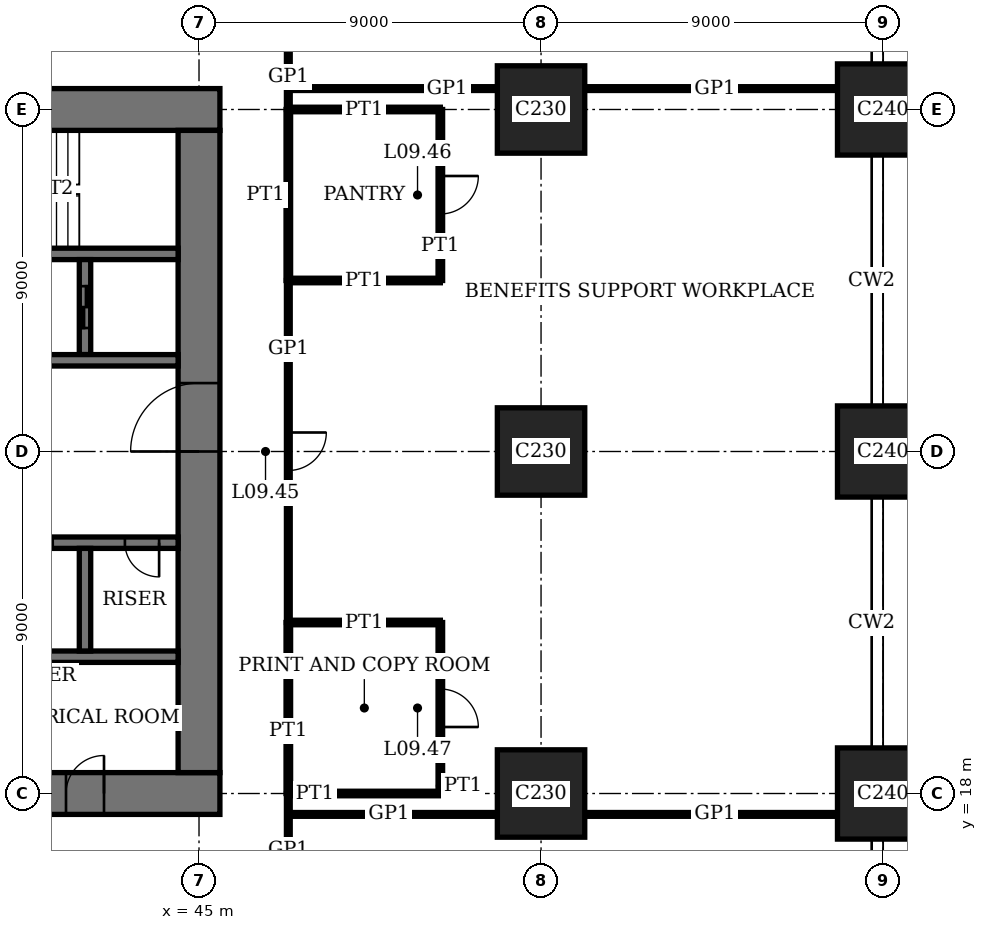
"""IFC4 building model, lengths in metres.
Left out: names, types, materials, properties, quantities, classifications, styles, units other than length and angle.
Written with IfcOpenShell. Run it as: python <this file> out.ifc"""

import sys

from ifc_helpers import new_model, si_unit, direction, frame, frame_2d, origin, origin_2d, place, context, subcontext, project, spatial, rectangle, extrude, element, fill, save


model = new_model("IFC4")
c1 = context("Model", 3, precision=1e-05, world=origin(), true_north=direction((0.0, 1.0)))
c2 = subcontext(c1, "Body", "Model", "MODEL_VIEW")
j1 = project(units=[si_unit("LENGTHUNIT", "METRE"), si_unit("PLANEANGLEUNIT", "RADIAN")], contexts=[c1])
p1 = place(None, origin())
s1 = spatial("IfcSite", under=j1, at=p1, CompositionType="ELEMENT")
p2 = place(p1, origin())
s2 = spatial("IfcBuilding", under=s1, at=p2, CompositionType="ELEMENT")
p3 = place(p2, frame((0.0, 0.0, 39.8)))
s3 = spatial("IfcBuildingStorey", under=s2, at=p3, CompositionType="ELEMENT", Elevation=39.8)
for number, where, z_axis, x_axis in (
    (1, (54.0, 18.0, 0.0), (0.0, 0.0, 1.0), (1.0, 0.0, 0.0)),
    (2, (54.0, 27.0, 0.0), (0.0, 0.0, 1.0), (1.0, 0.0, 0.0)),
    (3, (54.0, 36.0, 0.0), (0.0, 0.0, 1.0), (1.0, 0.0, 0.0)),
):
    element("IfcColumn", number, at=place(p3, frame(where, z_axis=z_axis, x_axis=x_axis)), inside=s3, PredefinedType="COLUMN", context=c2, shape_type="SweptSolid", body=[
        extrude(rectangle(XDim=2.3, YDim=2.3, at=origin_2d()), origin(), (0.0, 0.0, 1.0), 4.0),
    ])
for number, where, z_axis, x_axis in (
    (4, (63.0, 18.0, 0.0), (0.0, 0.0, 1.0), (1.0, 0.0, 0.0)),
    (5, (63.0, 27.0, 0.0), (0.0, 0.0, 1.0), (1.0, 0.0, 0.0)),
    (6, (63.0, 36.0, 0.0), (0.0, 0.0, 1.0), (1.0, 0.0, 0.0)),
):
    element("IfcColumn", number, at=place(p3, frame(where, z_axis=z_axis, x_axis=x_axis)), inside=s3, PredefinedType="COLUMN", context=c2, shape_type="SweptSolid", body=[
        extrude(rectangle(XDim=2.4, YDim=2.4, at=origin_2d()), origin(), (0.0, 0.0, 1.0), 4.0),
    ])
p4 = place(p3, frame((17.45, 18.0, 0.0), z_axis=(0.0, 0.0, 1.0), x_axis=(1.0, 0.0, 0.0)))
e7 = element("IfcWall", 7, at=p4, inside=s3, PredefinedType="SHEAR", context=c2, shape_type="SweptSolid", body=[
    extrude(rectangle(XDim=28.1, YDim=1.1, at=frame_2d((14.05, 0.0))), origin(), (0.0, 0.0, 1.0), 4.0),
])
p5 = place(p4, frame((11.55, 0.0, 0.0)))
e8 = element("IfcOpeningElement", 8, at=p5, cuts=e7, PredefinedType="OPENING", context=c2, shape_type="SweptSolid", body=[
    extrude(rectangle(XDim=1.0, YDim=2.4, at=frame_2d((0.5, 1.2))), frame((0.0, 0.56, 0.0), z_axis=(0.0, -1.0, 0.0), x_axis=(1.0, 0.0, 0.0)), (0.0, 0.0, 1.0), 1.12),
])
p6 = place(p4, frame((16.55, 0.0, 0.0)))
e9 = element("IfcOpeningElement", 9, at=p6, cuts=e7, PredefinedType="OPENING", context=c2, shape_type="SweptSolid", body=[
    extrude(rectangle(XDim=1.0, YDim=2.4, at=frame_2d((0.5, 1.2))), frame((0.0, 0.56, 0.0), z_axis=(0.0, -1.0, 0.0), x_axis=(1.0, 0.0, 0.0)), (0.0, 0.0, 1.0), 1.12),
])
p7 = place(p4, frame((20.0, 0.0, 0.0)))
e10 = element("IfcOpeningElement", 10, at=p7, cuts=e7, PredefinedType="OPENING", context=c2, shape_type="SweptSolid", body=[
    extrude(rectangle(XDim=1.1, YDim=2.4, at=frame_2d((0.55, 1.2))), frame((0.0, 0.56, 0.0), z_axis=(0.0, -1.0, 0.0), x_axis=(1.0, 0.0, 0.0)), (0.0, 0.0, 1.0), 1.12),
])
p8 = place(p4, frame((24.05, 0.0, 0.0)))
e11 = element("IfcOpeningElement", 11, at=p8, cuts=e7, PredefinedType="OPENING", context=c2, shape_type="SweptSolid", body=[
    extrude(rectangle(XDim=1.0, YDim=2.4, at=frame_2d((0.5, 1.2))), frame((0.0, 0.56, 0.0), z_axis=(0.0, -1.0, 0.0), x_axis=(1.0, 0.0, 0.0)), (0.0, 0.0, 1.0), 1.12),
])
p9 = place(p3, frame((45.55, 36.0, 0.0), z_axis=(0.0, 0.0, 1.0), x_axis=(-1.0, 0.0, 0.0)))
e12 = element("IfcWall", 12, at=p9, inside=s3, PredefinedType="SHEAR", context=c2, shape_type="SweptSolid", body=[
    extrude(rectangle(XDim=28.1, YDim=1.1, at=frame_2d((14.05, 0.0))), origin(), (0.0, 0.0, 1.0), 4.0),
])
p10 = place(p9, frame((11.55, 0.0, 0.0)))
e13 = element("IfcOpeningElement", 13, at=p10, cuts=e12, PredefinedType="OPENING", context=c2, shape_type="SweptSolid", body=[
    extrude(rectangle(XDim=1.0, YDim=2.4, at=frame_2d((0.5, 1.2))), frame((0.0, 0.56, 0.0), z_axis=(0.0, -1.0, 0.0), x_axis=(1.0, 0.0, 0.0)), (0.0, 0.0, 1.0), 1.12),
])
p11 = place(p9, frame((16.55, 0.0, 0.0)))
e14 = element("IfcOpeningElement", 14, at=p11, cuts=e12, PredefinedType="OPENING", context=c2, shape_type="SweptSolid", body=[
    extrude(rectangle(XDim=1.0, YDim=2.4, at=frame_2d((0.5, 1.2))), frame((0.0, 0.56, 0.0), z_axis=(0.0, -1.0, 0.0), x_axis=(1.0, 0.0, 0.0)), (0.0, 0.0, 1.0), 1.12),
])
p12 = place(p9, frame((20.0, 0.0, 0.0)))
e15 = element("IfcOpeningElement", 15, at=p12, cuts=e12, PredefinedType="OPENING", context=c2, shape_type="SweptSolid", body=[
    extrude(rectangle(XDim=1.1, YDim=2.4, at=frame_2d((0.55, 1.2))), frame((0.0, 0.56, 0.0), z_axis=(0.0, -1.0, 0.0), x_axis=(1.0, 0.0, 0.0)), (0.0, 0.0, 1.0), 1.12),
])
p13 = place(p9, frame((24.05, 0.0, 0.0)))
e16 = element("IfcOpeningElement", 16, at=p13, cuts=e12, PredefinedType="OPENING", context=c2, shape_type="SweptSolid", body=[
    extrude(rectangle(XDim=1.0, YDim=2.4, at=frame_2d((0.5, 1.2))), frame((0.0, 0.56, 0.0), z_axis=(0.0, -1.0, 0.0), x_axis=(1.0, 0.0, 0.0)), (0.0, 0.0, 1.0), 1.12),
])
p14 = place(p3, frame((45.0, 18.55, 0.0), z_axis=(0.0, 0.0, 1.0), x_axis=(0.0, 1.0, 0.0)))
e17 = element("IfcWall", 17, at=p14, inside=s3, PredefinedType="SHEAR", context=c2, shape_type="SweptSolid", body=[
    extrude(rectangle(XDim=16.9, YDim=1.1, at=frame_2d((8.45, 0.0))), origin(), (0.0, 0.0, 1.0), 4.0),
])
p15 = place(p14, frame((8.45, 0.0, 0.0)))
e18 = element("IfcOpeningElement", 18, at=p15, cuts=e17, PredefinedType="OPENING", context=c2, shape_type="SweptSolid", body=[
    extrude(rectangle(XDim=1.8, YDim=2.4, at=frame_2d((0.9, 1.2))), frame((0.0, 0.56, 0.0), z_axis=(0.0, -1.0, 0.0), x_axis=(1.0, 0.0, 0.0)), (0.0, 0.0, 1.0), 1.12),
])
p16 = place(p3, frame((36.15, 32.2, 0.0), z_axis=(0.0, 0.0, 1.0), x_axis=(1.0, 0.0, 0.0)))
e19 = element("IfcWall", 19, at=p16, inside=s3, PredefinedType="SHEAR", context=c2, shape_type="SweptSolid", body=[
    extrude(rectangle(XDim=8.3, YDim=0.3, at=frame_2d((4.15, 0.0))), origin(), (0.0, 0.0, 1.0), 4.0),
])
p17 = place(p16, frame((0.45, 0.0, 0.0)))
e20 = element("IfcOpeningElement", 20, at=p17, cuts=e19, PredefinedType="OPENING", context=c2, shape_type="SweptSolid", body=[
    extrude(rectangle(XDim=1.0, YDim=2.4, at=frame_2d((0.5, 1.2))), frame((0.0, 0.16, 0.0), z_axis=(0.0, -1.0, 0.0), x_axis=(1.0, 0.0, 0.0)), (0.0, 0.0, 1.0), 0.32),
])
p18 = place(p3, frame((42.0, 29.55, 0.0), z_axis=(0.0, 0.0, 1.0), x_axis=(0.0, 1.0, 0.0)))
e21 = element("IfcWall", 21, at=p18, inside=s3, PredefinedType="SHEAR", context=c2, shape_type="SweptSolid", body=[
    extrude(rectangle(XDim=2.5, YDim=0.3, at=frame_2d((1.25, 0.0))), origin(), (0.0, 0.0, 1.0), 4.0),
])
p19 = place(p18, frame((0.7, 0.0, 0.0)))
e22 = element("IfcOpeningElement", 22, at=p19, cuts=e21, PredefinedType="OPENING", context=c2, shape_type="SweptSolid", body=[
    extrude(rectangle(XDim=1.1, YDim=2.4, at=frame_2d((0.55, 1.2))), frame((0.0, 0.16, 0.0), z_axis=(0.0, -1.0, 0.0), x_axis=(1.0, 0.0, 0.0)), (0.0, 0.0, 1.0), 0.32),
])
p20 = place(p3, frame((18.55, 24.6, 0.0), z_axis=(0.0, 0.0, 1.0), x_axis=(1.0, 0.0, 0.0)))
e23 = element("IfcWall", 23, at=p20, inside=s3, PredefinedType="SHEAR", context=c2, shape_type="SweptSolid", body=[
    extrude(rectangle(XDim=25.9, YDim=0.3, at=frame_2d((12.95, 0.0))), origin(), (0.0, 0.0, 1.0), 4.0),
])
p21 = place(p20, frame((4.95, 0.0, 0.0)))
e24 = element("IfcOpeningElement", 24, at=p21, cuts=e23, PredefinedType="OPENING", context=c2, shape_type="SweptSolid", body=[
    extrude(rectangle(XDim=1.0, YDim=2.4, at=frame_2d((0.5, 1.2))), frame((0.0, 0.16, 0.0), z_axis=(0.0, -1.0, 0.0), x_axis=(1.0, 0.0, 0.0)), (0.0, 0.0, 1.0), 0.32),
])
p22 = place(p20, frame((24.5, 0.0, 0.0)))
e25 = element("IfcOpeningElement", 25, at=p22, cuts=e23, PredefinedType="OPENING", context=c2, shape_type="SweptSolid", body=[
    extrude(rectangle(XDim=0.9, YDim=2.1, at=frame_2d((0.45, 1.05))), frame((0.0, 0.16, 0.0), z_axis=(0.0, -1.0, 0.0), x_axis=(1.0, 0.0, 0.0)), (0.0, 0.0, 1.0), 0.32),
])
p23 = place(p20, frame((9.4, 0.0, 0.0)))
e26 = element("IfcOpeningElement", 26, at=p23, cuts=e23, PredefinedType="OPENING", context=c2, shape_type="SweptSolid", body=[
    extrude(rectangle(XDim=1.1, YDim=2.4, at=frame_2d((0.55, 1.2))), frame((0.0, 0.16, 0.0), z_axis=(0.0, -1.0, 0.0), x_axis=(1.0, 0.0, 0.0)), (0.0, 0.0, 1.0), 0.32),
])
p24 = place(p20, frame((12.4, 0.0, 0.0)))
e27 = element("IfcOpeningElement", 27, at=p24, cuts=e23, PredefinedType="OPENING", context=c2, shape_type="SweptSolid", body=[
    extrude(rectangle(XDim=1.1, YDim=2.4, at=frame_2d((0.55, 1.2))), frame((0.0, 0.16, 0.0), z_axis=(0.0, -1.0, 0.0), x_axis=(1.0, 0.0, 0.0)), (0.0, 0.0, 1.0), 0.32),
])
p25 = place(p20, frame((15.4, 0.0, 0.0)))
e28 = element("IfcOpeningElement", 28, at=p25, cuts=e23, PredefinedType="OPENING", context=c2, shape_type="SweptSolid", body=[
    extrude(rectangle(XDim=1.1, YDim=2.4, at=frame_2d((0.55, 1.2))), frame((0.0, 0.16, 0.0), z_axis=(0.0, -1.0, 0.0), x_axis=(1.0, 0.0, 0.0)), (0.0, 0.0, 1.0), 0.32),
])
p26 = place(p20, frame((18.4, 0.0, 0.0)))
e29 = element("IfcOpeningElement", 29, at=p26, cuts=e23, PredefinedType="OPENING", context=c2, shape_type="SweptSolid", body=[
    extrude(rectangle(XDim=1.1, YDim=2.4, at=frame_2d((0.55, 1.2))), frame((0.0, 0.16, 0.0), z_axis=(0.0, -1.0, 0.0), x_axis=(1.0, 0.0, 0.0)), (0.0, 0.0, 1.0), 0.32),
])
p27 = place(p20, frame((21.3, 0.0, 0.0)))
e30 = element("IfcOpeningElement", 30, at=p27, cuts=e23, PredefinedType="OPENING", context=c2, shape_type="SweptSolid", body=[
    extrude(rectangle(XDim=1.3, YDim=2.4, at=frame_2d((0.65, 1.2))), frame((0.0, 0.16, 0.0), z_axis=(0.0, -1.0, 0.0), x_axis=(1.0, 0.0, 0.0)), (0.0, 0.0, 1.0), 0.32),
])
p28 = place(p3, frame((18.55, 29.4, 0.0), z_axis=(0.0, 0.0, 1.0), x_axis=(1.0, 0.0, 0.0)))
e31 = element("IfcWall", 31, at=p28, inside=s3, PredefinedType="SHEAR", context=c2, shape_type="SweptSolid", body=[
    extrude(rectangle(XDim=25.9, YDim=0.3, at=frame_2d((12.95, 0.0))), origin(), (0.0, 0.0, 1.0), 4.0),
])
p29 = place(p28, frame((19.95, 0.0, 0.0)))
e32 = element("IfcOpeningElement", 32, at=p29, cuts=e31, PredefinedType="OPENING", context=c2, shape_type="SweptSolid", body=[
    extrude(rectangle(XDim=1.0, YDim=2.4, at=frame_2d((0.5, 1.2))), frame((0.0, 0.16, 0.0), z_axis=(0.0, -1.0, 0.0), x_axis=(1.0, 0.0, 0.0)), (0.0, 0.0, 1.0), 0.32),
])
p30 = place(p28, frame((0.5, 0.0, 0.0)))
e33 = element("IfcOpeningElement", 33, at=p30, cuts=e31, PredefinedType="OPENING", context=c2, shape_type="SweptSolid", body=[
    extrude(rectangle(XDim=0.9, YDim=2.1, at=frame_2d((0.45, 1.05))), frame((0.0, 0.16, 0.0), z_axis=(0.0, -1.0, 0.0), x_axis=(1.0, 0.0, 0.0)), (0.0, 0.0, 1.0), 0.32),
])
p31 = place(p28, frame((3.3, 0.0, 0.0)))
e34 = element("IfcOpeningElement", 34, at=p31, cuts=e31, PredefinedType="OPENING", context=c2, shape_type="SweptSolid", body=[
    extrude(rectangle(XDim=1.3, YDim=2.4, at=frame_2d((0.65, 1.2))), frame((0.0, 0.16, 0.0), z_axis=(0.0, -1.0, 0.0), x_axis=(1.0, 0.0, 0.0)), (0.0, 0.0, 1.0), 0.32),
])
p32 = place(p3, frame((27.15, 21.6, 0.0), z_axis=(0.0, 0.0, 1.0), x_axis=(1.0, 0.0, 0.0)))
e35 = element("IfcWall", 35, at=p32, inside=s3, PredefinedType="SHEAR", context=c2, shape_type="SweptSolid", body=[
    extrude(rectangle(XDim=17.3, YDim=0.3, at=frame_2d((8.65, 0.0))), origin(), (0.0, 0.0, 1.0), 4.0),
])
p33 = place(p3, frame((42.0, 21.75, 0.0), z_axis=(0.0, 0.0, 1.0), x_axis=(0.0, 1.0, 0.0)))
e36 = element("IfcWall", 36, at=p33, inside=s3, PredefinedType="SHEAR", context=c2, shape_type="SweptSolid", body=[
    extrude(rectangle(XDim=2.7, YDim=0.3, at=frame_2d((1.35, 0.0))), origin(), (0.0, 0.0, 1.0), 4.0),
])
p34 = place(p3, frame((47.35, 17.45, 0.0), z_axis=(0.0, 0.0, 1.0), x_axis=(1.0, 0.0, 0.0)))
e37 = element("IfcWall", 37, at=p34, inside=s3, PredefinedType="PARTITIONING", context=c2, shape_type="SweptSolid", body=[
    extrude(rectangle(XDim=5.5, YDim=0.1, at=frame_2d((2.75, 0.0))), origin(), (0.0, 0.0, 1.0), 3.75),
])
p35 = place(p3, frame((55.15, 17.45, 0.0), z_axis=(0.0, 0.0, 1.0), x_axis=(1.0, 0.0, 0.0)))
e38 = element("IfcWall", 38, at=p35, inside=s3, PredefinedType="PARTITIONING", context=c2, shape_type="SweptSolid", body=[
    extrude(rectangle(XDim=6.65, YDim=0.1, at=frame_2d((3.325, 0.0))), origin(), (0.0, 0.0, 1.0), 3.75),
])
p36 = place(p3, frame((47.35, 18.0, 0.0), z_axis=(0.0, 0.0, 1.0), x_axis=(1.0, 0.0, 0.0)))
e39 = element("IfcWall", 39, at=p36, inside=s3, PredefinedType="PARTITIONING", context=c2, shape_type="SweptSolid", body=[
    extrude(rectangle(XDim=4.0, YDim=0.12, at=frame_2d((2.0, 0.0))), origin(), (0.0, 0.0, 1.0), 3.05),
])
for number, where, z_axis, x_axis in (
    (40, (47.35, 22.5, 0.0), (0.0, 0.0, 1.0), (1.0, 0.0, 0.0)),
    (41, (47.35, 31.5, 0.0), (0.0, 0.0, 1.0), (1.0, 0.0, 0.0)),
):
    element("IfcWall", number, at=place(p3, frame(where, z_axis=z_axis, x_axis=x_axis)), inside=s3, PredefinedType="PARTITIONING", context=c2, shape_type="SweptSolid", body=[
        extrude(rectangle(XDim=4.0, YDim=0.12, at=frame_2d((2.0, 0.0))), origin(), (0.0, 0.0, 1.0), 3.1),
    ])
p37 = place(p3, frame((47.35, 36.0, 0.0), z_axis=(0.0, 0.0, 1.0), x_axis=(1.0, 0.0, 0.0)))
e42 = element("IfcWall", 42, at=p37, inside=s3, PredefinedType="PARTITIONING", context=c2, shape_type="SweptSolid", body=[
    extrude(rectangle(XDim=4.0, YDim=0.12, at=frame_2d((2.0, 0.0))), origin(), (0.0, 0.0, 1.0), 3.05),
])
p38 = place(p3, frame((47.35, 36.55, 0.0), z_axis=(0.0, 0.0, 1.0), x_axis=(1.0, 0.0, 0.0)))
e43 = element("IfcWall", 43, at=p38, inside=s3, PredefinedType="PARTITIONING", context=c2, shape_type="SweptSolid", body=[
    extrude(rectangle(XDim=5.5, YDim=0.1, at=frame_2d((2.75, 0.0))), origin(), (0.0, 0.0, 1.0), 3.75),
])
p39 = place(p3, frame((55.15, 36.55, 0.0), z_axis=(0.0, 0.0, 1.0), x_axis=(1.0, 0.0, 0.0)))
e44 = element("IfcWall", 44, at=p39, inside=s3, PredefinedType="PARTITIONING", context=c2, shape_type="SweptSolid", body=[
    extrude(rectangle(XDim=6.65, YDim=0.1, at=frame_2d((3.325, 0.0))), origin(), (0.0, 0.0, 1.0), 3.75),
])
for number, where, z_axis, x_axis in (
    (45, (47.35, 31.5, 0.0), (0.0, 0.0, 1.0), (0.0, 1.0, 0.0)),
    (46, (47.35, 18.0, 0.0), (0.0, 0.0, 1.0), (0.0, 1.0, 0.0)),
):
    element("IfcWall", number, at=place(p3, frame(where, z_axis=z_axis, x_axis=x_axis)), inside=s3, PredefinedType="PARTITIONING", context=c2, shape_type="SweptSolid", body=[
        extrude(rectangle(XDim=4.5, YDim=0.12, at=frame_2d((2.25, 0.0))), origin(), (0.0, 0.0, 1.0), 3.75),
    ])
p40 = place(p3, frame((47.35, 15.65, 0.0), z_axis=(0.0, 0.0, 1.0), x_axis=(0.0, 1.0, 0.0)))
e47 = element("IfcWall", 47, at=p40, inside=s3, PredefinedType="PARTITIONING", context=c2, shape_type="SweptSolid", body=[
    extrude(rectangle(XDim=2.35, YDim=0.1, at=frame_2d((1.175, 0.0))), origin(), (0.0, 0.0, 1.0), 3.75),
])
p41 = place(p3, frame((47.35, 22.5, 0.0), z_axis=(0.0, 0.0, 1.0), x_axis=(0.0, 1.0, 0.0)))
e48 = element("IfcWall", 48, at=p41, inside=s3, PredefinedType="PARTITIONING", context=c2, shape_type="SweptSolid", body=[
    extrude(rectangle(XDim=9.0, YDim=0.1, at=frame_2d((4.5, 0.0))), origin(), (0.0, 0.0, 1.0), 3.75),
])
p42 = place(p41, frame((4.0, 0.0, 0.0)))
e49 = element("IfcOpeningElement", 49, at=p42, cuts=e48, PredefinedType="OPENING", context=c2, shape_type="SweptSolid", body=[
    extrude(rectangle(XDim=1.0, YDim=2.4, at=frame_2d((0.5, 1.2))), frame((0.0, 0.06, 0.0), z_axis=(0.0, -1.0, 0.0), x_axis=(1.0, 0.0, 0.0)), (0.0, 0.0, 1.0), 0.12),
])
p43 = place(p3, frame((47.35, 36.0, 0.0), z_axis=(0.0, 0.0, 1.0), x_axis=(0.0, 1.0, 0.0)))
e50 = element("IfcWall", 50, at=p43, inside=s3, PredefinedType="PARTITIONING", context=c2, shape_type="SweptSolid", body=[
    extrude(rectangle(XDim=2.35, YDim=0.1, at=frame_2d((1.175, 0.0))), origin(), (0.0, 0.0, 1.0), 3.75),
])
p44 = place(p3, frame((51.35, 31.5, 0.0), z_axis=(0.0, 0.0, 1.0), x_axis=(0.0, 1.0, 0.0)))
e51 = element("IfcWall", 51, at=p44, inside=s3, PredefinedType="PARTITIONING", context=c2, shape_type="SweptSolid", body=[
    extrude(rectangle(XDim=4.5, YDim=0.12, at=frame_2d((2.25, 0.0))), origin(), (0.0, 0.0, 1.0), 3.75),
])
p45 = place(p44, frame((1.75, 0.0, 0.0)))
e52 = element("IfcOpeningElement", 52, at=p45, cuts=e51, PredefinedType="OPENING", context=c2, shape_type="SweptSolid", body=[
    extrude(rectangle(XDim=1.0, YDim=2.4, at=frame_2d((0.5, 1.2))), frame((0.0, 0.07, 0.0), z_axis=(0.0, -1.0, 0.0), x_axis=(1.0, 0.0, 0.0)), (0.0, 0.0, 1.0), 0.14),
])
p46 = place(p3, frame((51.35, 18.0, 0.0), z_axis=(0.0, 0.0, 1.0), x_axis=(0.0, 1.0, 0.0)))
e53 = element("IfcWall", 53, at=p46, inside=s3, PredefinedType="PARTITIONING", context=c2, shape_type="SweptSolid", body=[
    extrude(rectangle(XDim=4.5, YDim=0.12, at=frame_2d((2.25, 0.0))), origin(), (0.0, 0.0, 1.0), 3.75),
])
p47 = place(p46, frame((1.75, 0.0, 0.0)))
e54 = element("IfcOpeningElement", 54, at=p47, cuts=e53, PredefinedType="OPENING", context=c2, shape_type="SweptSolid", body=[
    extrude(rectangle(XDim=1.0, YDim=2.4, at=frame_2d((0.5, 1.2))), frame((0.0, 0.07, 0.0), z_axis=(0.0, -1.0, 0.0), x_axis=(1.0, 0.0, 0.0)), (0.0, 0.0, 1.0), 0.14),
])
p48 = place(p15, origin())
e55 = element("IfcDoor", 55, at=p48, inside=s3, OperationType="DOUBLE_DOOR_DOUBLE_SWING", PredefinedType="DOOR", context=c2, shape_type="SweptSolid", body=[
    extrude(rectangle(XDim=1.8, YDim=2.4, at=frame_2d((0.9, 1.2))), frame((0.0, 0.03, 0.0), z_axis=(0.0, -1.0, 0.0), x_axis=(1.0, 0.0, 0.0)), (0.0, 0.0, 1.0), 0.06),
    extrude(rectangle(XDim=0.04, YDim=2.4, at=frame_2d((0.02, 1.2))), frame((0.0, 0.55, 0.0), z_axis=(0.0, -1.0, 0.0), x_axis=(1.0, 0.0, 0.0)), (0.0, 0.0, 1.0), 1.1),
    extrude(rectangle(XDim=0.04, YDim=2.4, at=frame_2d((1.78, 1.2))), frame((0.0, 0.55, 0.0), z_axis=(0.0, -1.0, 0.0), x_axis=(1.0, 0.0, 0.0)), (0.0, 0.0, 1.0), 1.1),
    extrude(rectangle(XDim=1.8, YDim=0.04, at=frame_2d((0.9, 2.38))), frame((0.0, 0.55, 0.0), z_axis=(0.0, -1.0, 0.0), x_axis=(1.0, 0.0, 0.0)), (0.0, 0.0, 1.0), 1.1),
])
fill(e18, e55)
p49 = place(p8, origin())
e56 = element("IfcDoor", 56, at=p49, inside=s3, OperationType="SINGLE_SWING_LEFT", PredefinedType="DOOR", context=c2, shape_type="SweptSolid", body=[
    extrude(rectangle(XDim=1.0, YDim=2.4, at=frame_2d((0.5, 1.2))), frame((0.0, 0.025, 0.0), z_axis=(0.0, -1.0, 0.0), x_axis=(1.0, 0.0, 0.0)), (0.0, 0.0, 1.0), 0.05),
    extrude(rectangle(XDim=0.04, YDim=2.4, at=frame_2d((0.02, 1.2))), frame((0.0, 0.4, 0.0), z_axis=(0.0, -1.0, 0.0), x_axis=(1.0, 0.0, 0.0)), (0.0, 0.0, 1.0), 0.8),
    extrude(rectangle(XDim=0.04, YDim=2.4, at=frame_2d((0.98, 1.2))), frame((0.0, 0.4, 0.0), z_axis=(0.0, -1.0, 0.0), x_axis=(1.0, 0.0, 0.0)), (0.0, 0.0, 1.0), 0.8),
    extrude(rectangle(XDim=1.0, YDim=0.04, at=frame_2d((0.5, 2.38))), frame((0.0, 0.4, 0.0), z_axis=(0.0, -1.0, 0.0), x_axis=(1.0, 0.0, 0.0)), (0.0, 0.0, 1.0), 0.8),
])
fill(e11, e56)
p50 = place(p22, origin())
e57 = element("IfcDoor", 57, at=p50, inside=s3, OperationType="SINGLE_SWING_RIGHT", PredefinedType="DOOR", context=c2, shape_type="SweptSolid", body=[
    extrude(rectangle(XDim=0.9, YDim=2.1, at=frame_2d((0.45, 1.05))), frame((0.0, 0.03, 0.0), z_axis=(0.0, -1.0, 0.0), x_axis=(1.0, 0.0, 0.0)), (0.0, 0.0, 1.0), 0.06),
])
fill(e25, e57)
p51 = place(p42, origin())
e58 = element("IfcDoor", 58, at=p51, inside=s3, OperationType="SINGLE_SWING_RIGHT", PredefinedType="DOOR", context=c2, shape_type="SweptSolid", body=[
    extrude(rectangle(XDim=1.0, YDim=2.4, at=frame_2d((0.5, 1.2))), frame((0.0, 0.02, 0.0), z_axis=(0.0, -1.0, 0.0), x_axis=(1.0, 0.0, 0.0)), (0.0, 0.0, 1.0), 0.04),
])
fill(e49, e58)
p52 = place(p45, origin())
e59 = element("IfcDoor", 59, at=p52, inside=s3, OperationType="SINGLE_SWING_RIGHT", PredefinedType="DOOR", context=c2, shape_type="SweptSolid", body=[
    extrude(rectangle(XDim=1.0, YDim=2.4, at=frame_2d((0.5, 1.2))), frame((0.0, 0.025, 0.0), z_axis=(0.0, -1.0, 0.0), x_axis=(1.0, 0.0, 0.0)), (0.0, 0.0, 1.0), 0.05),
])
fill(e52, e59)
p53 = place(p47, origin())
e60 = element("IfcDoor", 60, at=p53, inside=s3, OperationType="SINGLE_SWING_LEFT", PredefinedType="DOOR", context=c2, shape_type="SweptSolid", body=[
    extrude(rectangle(XDim=1.0, YDim=2.4, at=frame_2d((0.5, 1.2))), frame((0.0, 0.025, 0.0), z_axis=(0.0, -1.0, 0.0), x_axis=(1.0, 0.0, 0.0)), (0.0, 0.0, 1.0), 0.05),
])
fill(e54, e60)
p54 = place(p27, origin())
e61 = element("IfcDoor", 61, at=p54, inside=s3, OperationType="DOUBLE_DOOR_SLIDING", PredefinedType="DOOR", context=c2, shape_type="SweptSolid", body=[
    extrude(rectangle(XDim=1.3, YDim=2.4, at=frame_2d((0.65, 1.2))), frame((0.0, 0.02, 0.0), z_axis=(0.0, -1.0, 0.0), x_axis=(1.0, 0.0, 0.0)), (0.0, 0.0, 1.0), 0.04),
])
fill(e30, e61)
p55 = place(p19, origin())
e62 = element("IfcDoor", 62, at=p55, inside=s3, OperationType="DOUBLE_DOOR_SLIDING", PredefinedType="DOOR", context=c2, shape_type="SweptSolid", body=[
    extrude(rectangle(XDim=1.1, YDim=2.4, at=frame_2d((0.55, 1.2))), frame((0.0, 0.03, 0.0), z_axis=(0.0, -1.0, 0.0), x_axis=(1.0, 0.0, 0.0)), (0.0, 0.0, 1.0), 0.06),
])
fill(e22, e62)
save(model, sys.argv[1])
